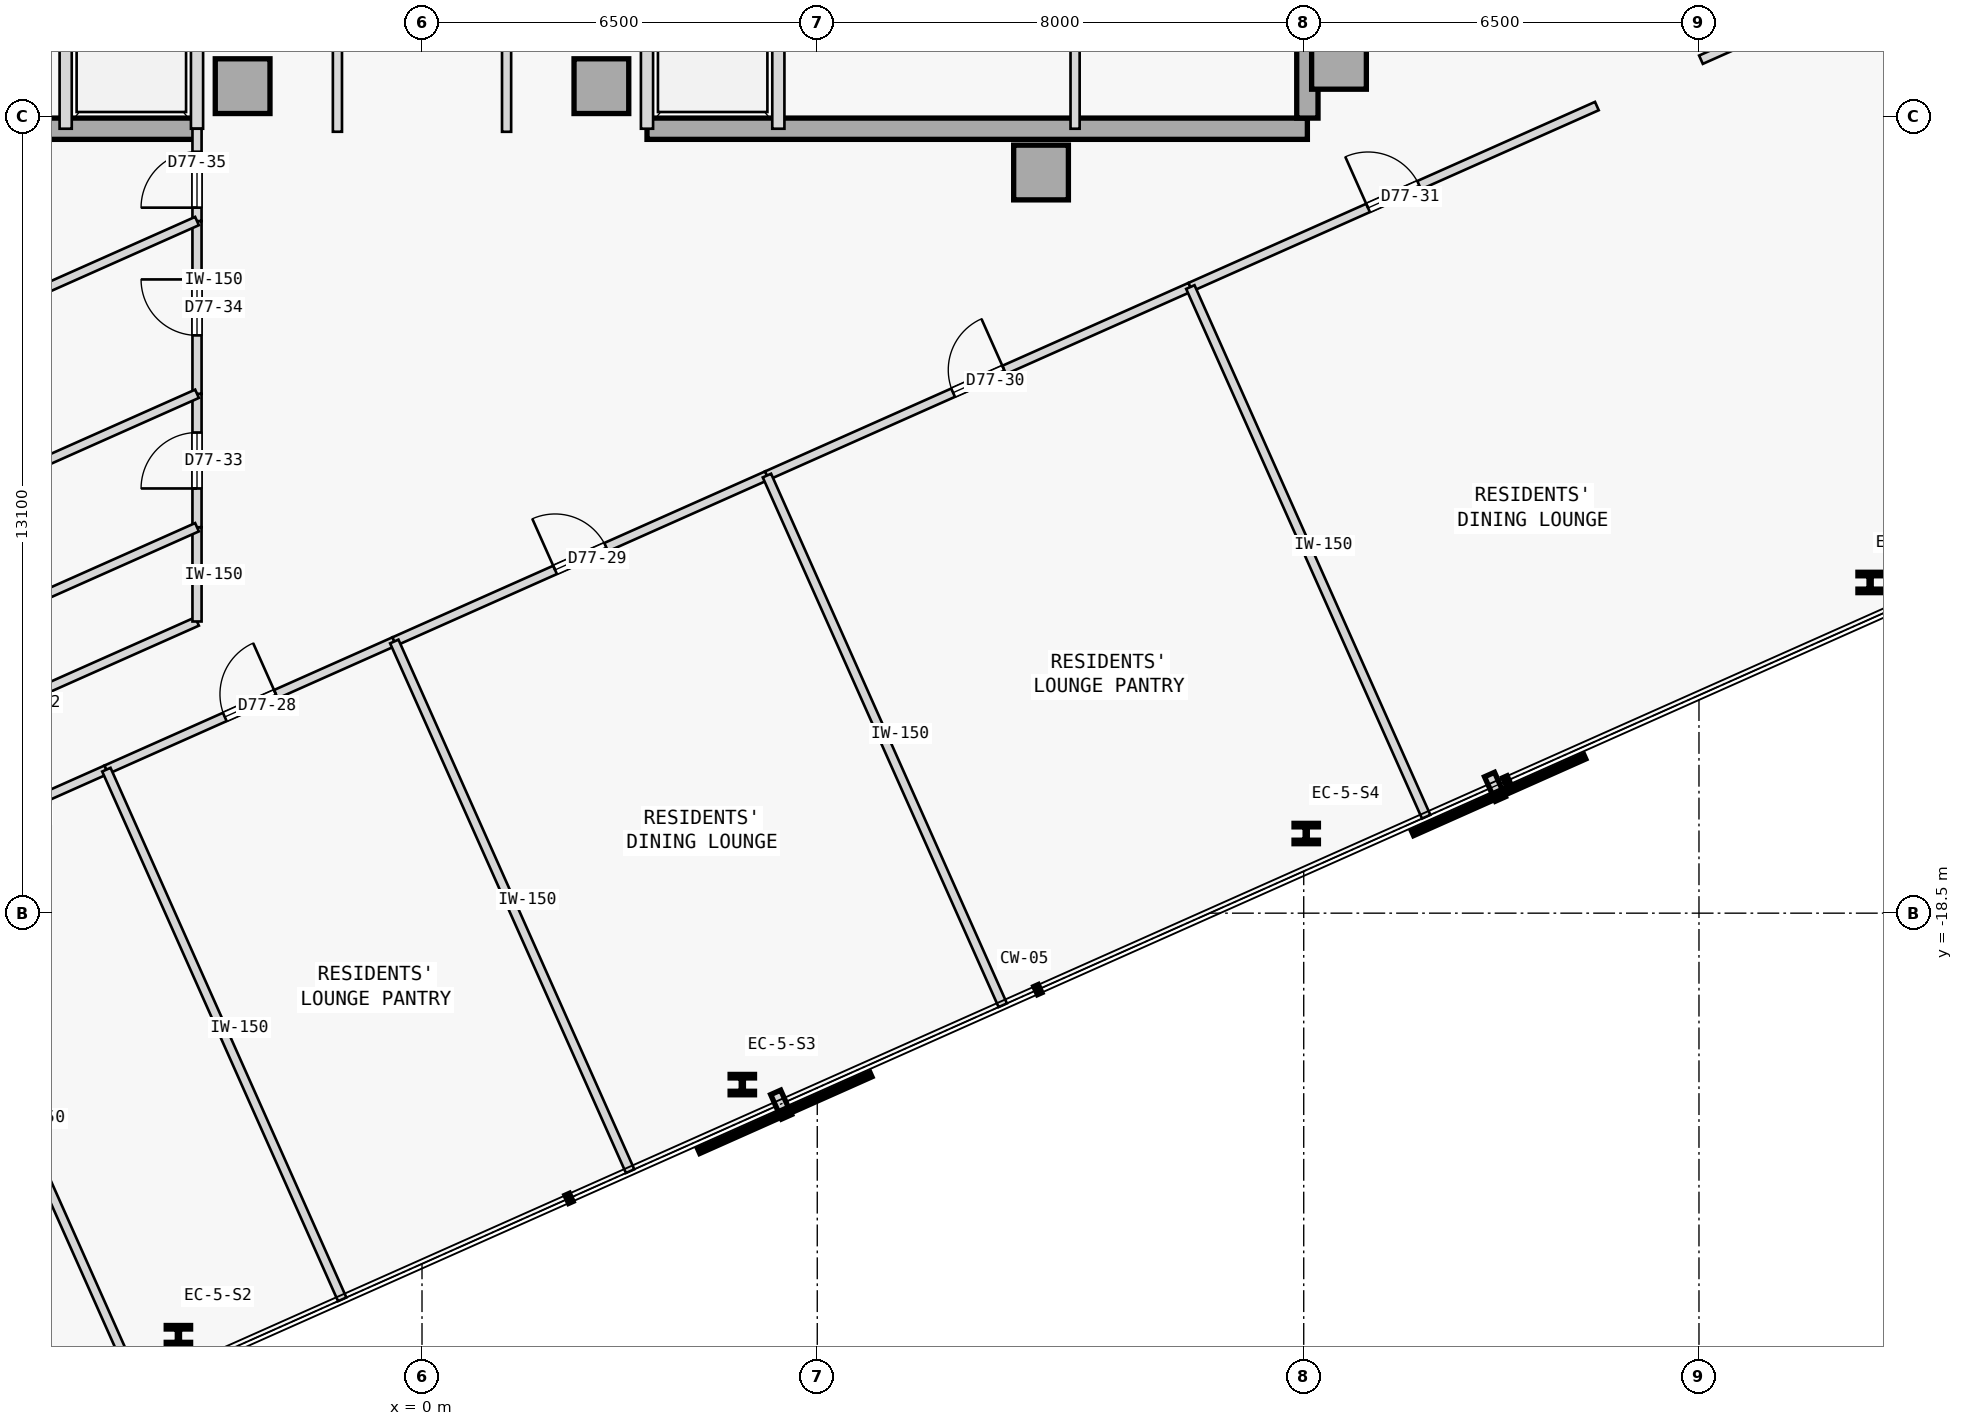
"""IFC4 building model, lengths in metres.
Left out: names, types, materials, properties, quantities, classifications, styles, units other than length and angle.
Written with IfcOpenShell. Run it as: python <this file> out.ifc"""

import sys

from ifc_helpers import new_model, si_unit, direction, frame, frame_2d, origin, origin_2d, place, context, subcontext, project, spatial, rectangle, i_section, extrude, element, fill, save


model = new_model("IFC4")
c1 = context("Model", 3, precision=1e-05, world=origin(), true_north=direction((0.0, 1.0)))
c2 = subcontext(c1, "Body", "Model", "MODEL_VIEW")
j1 = project(units=[si_unit("LENGTHUNIT", "METRE"), si_unit("PLANEANGLEUNIT", "RADIAN")], contexts=[c1])
p1 = place(None, origin())
s1 = spatial("IfcSite", under=j1, at=p1, CompositionType="ELEMENT")
p2 = place(p1, origin())
s2 = spatial("IfcBuilding", under=s1, at=p2, CompositionType="ELEMENT")
p3 = place(p2, frame((0.0, 0.0, 288.6)))
s3 = spatial("IfcBuildingStorey", under=s2, at=p3, CompositionType="ELEMENT", Elevation=288.6)
for number, where, z_axis, x_axis in (
    (1, (-2.95, -4.9, 0.0), (0.0, 0.0, 1.0), (1.0, 0.0, 0.0)),
    (2, (15.08, -4.5, 0.0), (0.0, 0.0, 1.0), (1.0, 0.0, 0.0)),
    (3, (10.18, -6.32, 0.0), (0.0, 0.0, 1.0), (1.0, 0.0, 0.0)),
    (4, (2.95, -4.9, 0.0), (0.0, 0.0, 1.0), (1.0, 0.0, 0.0)),
):
    element("IfcColumn", number, at=place(p3, frame(where, z_axis=z_axis, x_axis=x_axis)), inside=s3, PredefinedType="COLUMN", context=c2, shape_type="SweptSolid", body=[
        extrude(rectangle(XDim=0.9, YDim=0.9, at=origin_2d()), origin(), (0.0, 0.0, 1.0), 3.35),
    ])
for number, where, z_axis, x_axis in (
    (5, (-14.56, -5.6, 0.0), (0.0, 0.0, 1.0), (1.0, 0.0, 0.0)),
    (6, (3.7, -5.6, 0.0), (0.0, 0.0, 1.0), (1.0, 0.0, 0.0)),
):
    element("IfcWall", number, at=place(p3, frame(where, z_axis=z_axis, x_axis=x_axis)), inside=s3, PredefinedType="SHEAR", context=c2, shape_type="SweptSolid", body=[
        extrude(rectangle(XDim=10.86, YDim=0.35, at=frame_2d((5.43, 0.0))), origin(), (0.0, 0.0, 1.0), 3.125),
    ])
p4 = place(p3, frame((14.56, -5.425, 0.0), z_axis=(0.0, 0.0, 1.0), x_axis=(0.0, 1.0, 0.0)))
e7 = element("IfcWall", 7, at=p4, inside=s3, PredefinedType="SHEAR", context=c2, shape_type="SweptSolid", body=[
    extrude(rectangle(XDim=10.85, YDim=0.35, at=frame_2d((5.425, 0.0))), origin(), (0.0, 0.0, 1.0), 3.125),
])
for number, where, z_axis, x_axis in (
    (8, (-4.006, -25.448, 0.0), (0.0, 0.0, 1.0), (1.0, 0.0, 0.0)),
    (9, (5.268, -21.319, 0.0), (0.0, 0.0, 1.0), (1.0, 0.0, 0.0)),
    (10, (14.541, -17.19, 0.0), (0.0, 0.0, 1.0), (1.0, 0.0, 0.0)),
    (11, (23.814, -13.062, 0.0), (0.0, 0.0, 1.0), (1.0, 0.0, 0.0)),
):
    element("IfcColumn", number, at=place(p3, frame(where, z_axis=z_axis, x_axis=x_axis)), inside=s3, PredefinedType="COLUMN", context=c2, shape_type="SweptSolid", body=[
        extrude(i_section(OverallWidth=0.401, OverallDepth=0.335, WebThickness=0.036, FlangeThickness=0.058, FilletRadius=0.015, at=origin_2d()), origin(), (0.0, 0.0, 1.0), 3.35),
    ])
for number, where, z_axis, x_axis in (
    (12, (-3.7, -5.6, 0.0), (0.0, 0.0, 1.0), (0.0, 1.0, 0.0)),
    (13, (-5.86, -5.6, 0.0), (0.0, 0.0, 1.0), (0.0, 1.0, 0.0)),
    (14, (3.7, -5.6, 0.0), (0.0, 0.0, 1.0), (0.0, 1.0, 0.0)),
    (15, (5.86, -5.6, 0.0), (0.0, 0.0, 1.0), (0.0, 1.0, 0.0)),
):
    element("IfcWall", number, at=place(p3, frame(where, z_axis=z_axis, x_axis=x_axis)), inside=s3, PredefinedType="STANDARD", context=c2, shape_type="SweptSolid", body=[
        extrude(rectangle(XDim=2.65, YDim=0.2, at=frame_2d((1.325, 0.0))), origin(), (0.0, 0.0, 1.0), 3.125),
    ])
p5 = place(p3, frame((10.74, -5.6, 0.0), z_axis=(0.0, 0.0, 1.0), x_axis=(0.0, 1.0, 0.0)))
e16 = element("IfcWall", 16, at=p5, inside=s3, PredefinedType="PARTITIONING", context=c2, shape_type="SweptSolid", body=[
    extrude(rectangle(XDim=2.65, YDim=0.15, at=frame_2d((1.325, 0.0))), origin(), (0.0, 0.0, 1.0), 3.125),
])
p6 = place(p3, frame((-1.391, -5.65, 0.0), z_axis=(0.0, 0.0, 1.0), x_axis=(-2.1605738e-05, 0.999999999767, 0.0)))
e17 = element("IfcWall", 17, at=p6, inside=s3, PredefinedType="PARTITIONING", context=c2, shape_type="SweptSolid", body=[
    extrude(rectangle(XDim=11.3, YDim=0.15, at=frame_2d((5.65, 0.0))), origin(), (0.0, 0.0, 1.0), 3.125),
])
p7 = place(p3, frame((1.391, -5.65, 0.0), z_axis=(0.0, 0.0, 1.0), x_axis=(4.3206809e-05, 0.999999999067, 0.0)))
e18 = element("IfcWall", 18, at=p7, inside=s3, PredefinedType="PARTITIONING", context=c2, shape_type="SweptSolid", body=[
    extrude(rectangle(XDim=11.301, YDim=0.15, at=frame_2d((5.65, 0.0))), origin(), (0.0, 0.0, 1.0), 3.125),
])
p8 = place(p7, frame((5.176, 0.0, 0.0)))
e19 = element("IfcOpeningElement", 19, at=p8, cuts=e18, PredefinedType="OPENING", context=c2, shape_type="SweptSolid", body=[
    extrude(rectangle(XDim=0.95, YDim=2.15, at=frame_2d((0.475, 1.075))), frame((0.0, 0.085, 0.0), z_axis=(0.0, -1.0, 0.0), x_axis=(1.0, 0.0, 0.0)), (0.0, 0.0, 1.0), 0.17),
])
p9 = place(p3, frame((21.033, -4.465, 0.0), z_axis=(0.0, 0.0, 1.0), x_axis=(0.913543802, 0.40674036169, 0.0)))
e20 = element("IfcWall", 20, at=p9, inside=s3, PredefinedType="PARTITIONING", context=c2, shape_type="SweptSolid", body=[
    extrude(rectangle(XDim=3.65, YDim=0.15, at=frame_2d((1.825, 0.0))), origin(), (0.0, 0.0, 1.0), 3.125),
])
p10 = place(p3, frame((-8.533, -17.628, 0.0), z_axis=(0.0, 0.0, 1.0), x_axis=(0.913560976273, 0.406701785873, 0.0)))
e21 = element("IfcWall", 21, at=p10, inside=s3, PredefinedType="PARTITIONING", context=c2, shape_type="SweptSolid", body=[
    extrude(rectangle(XDim=3.659, YDim=0.15, at=frame_2d((1.829, 0.0))), origin(), (0.0, 0.0, 1.0), 3.125),
])
p11 = place(p10, frame((1.369, 0.0, 0.0)))
e22 = element("IfcOpeningElement", 22, at=p11, cuts=e21, PredefinedType="OPENING", context=c2, shape_type="SweptSolid", body=[
    extrude(rectangle(XDim=0.92, YDim=2.15, at=frame_2d((0.46, 1.075))), frame((0.0, 0.085, 0.0), z_axis=(0.0, -1.0, 0.0), x_axis=(1.0, 0.0, 0.0)), (0.0, 0.0, 1.0), 0.17),
])
p12 = place(p3, frame((-5.191, -16.14, 0.0), z_axis=(0.0, 0.0, 1.0), x_axis=(0.913541346619, 0.40674587646, 0.0)))
e23 = element("IfcWall", 23, at=p12, inside=s3, PredefinedType="PARTITIONING", context=c2, shape_type="SweptSolid", body=[
    extrude(rectangle(XDim=5.183, YDim=0.15, at=frame_2d((2.591, 0.0))), origin(), (0.0, 0.0, 1.0), 3.125),
])
p13 = place(p12, frame((2.132, 0.0, 0.0)))
e24 = element("IfcOpeningElement", 24, at=p13, cuts=e23, PredefinedType="OPENING", context=c2, shape_type="SweptSolid", body=[
    extrude(rectangle(XDim=0.92, YDim=2.15, at=frame_2d((0.46, 1.075))), frame((0.0, 0.085, 0.0), z_axis=(0.0, -1.0, 0.0), x_axis=(1.0, 0.0, 0.0)), (0.0, 0.0, 1.0), 0.17),
])
p14 = place(p3, frame((-0.456, -14.032, 0.0), z_axis=(0.0, 0.0, 1.0), x_axis=(0.913541200883, 0.40674620378, 0.0)))
e25 = element("IfcWall", 25, at=p14, inside=s3, PredefinedType="PARTITIONING", context=c2, shape_type="SweptSolid", body=[
    extrude(rectangle(XDim=6.708, YDim=0.15, at=frame_2d((3.354, 0.0))), origin(), (0.0, 0.0, 1.0), 3.125),
])
p15 = place(p14, frame((2.894, 0.0, 0.0)))
e26 = element("IfcOpeningElement", 26, at=p15, cuts=e25, PredefinedType="OPENING", context=c2, shape_type="SweptSolid", body=[
    extrude(rectangle(XDim=0.92, YDim=2.15, at=frame_2d((0.46, 1.075))), frame((0.0, 0.085, 0.0), z_axis=(0.0, -1.0, 0.0), x_axis=(1.0, 0.0, 0.0)), (0.0, 0.0, 1.0), 0.17),
])
p16 = place(p3, frame((5.672, -11.304, 0.0), z_axis=(0.0, 0.0, 1.0), x_axis=(0.913549829505, 0.40672682357, 0.0)))
e27 = element("IfcWall", 27, at=p16, inside=s3, PredefinedType="PARTITIONING", context=c2, shape_type="SweptSolid", body=[
    extrude(rectangle(XDim=7.622, YDim=0.15, at=frame_2d((3.811, 0.0))), origin(), (0.0, 0.0, 1.0), 3.125),
])
p17 = place(p16, frame((3.351, 0.0, 0.0)))
e28 = element("IfcOpeningElement", 28, at=p17, cuts=e27, PredefinedType="OPENING", context=c2, shape_type="SweptSolid", body=[
    extrude(rectangle(XDim=0.92, YDim=2.15, at=frame_2d((0.46, 1.075))), frame((0.0, 0.085, 0.0), z_axis=(0.0, -1.0, 0.0), x_axis=(1.0, 0.0, 0.0)), (0.0, 0.0, 1.0), 0.17),
])
p18 = place(p3, frame((12.635, -8.204, 0.0), z_axis=(0.0, 0.0, 1.0), x_axis=(0.913541702649, 0.406745076825, 0.0)))
e29 = element("IfcWall", 29, at=p18, inside=s3, PredefinedType="PARTITIONING", context=c2, shape_type="SweptSolid", body=[
    extrude(rectangle(XDim=7.318, YDim=0.15, at=frame_2d((3.659, 0.0))), origin(), (0.0, 0.0, 1.0), 3.125),
])
p19 = place(p18, frame((3.199, 0.0, 0.0)))
e30 = element("IfcOpeningElement", 30, at=p19, cuts=e29, PredefinedType="OPENING", context=c2, shape_type="SweptSolid", body=[
    extrude(rectangle(XDim=0.92, YDim=2.15, at=frame_2d((0.46, 1.075))), frame((0.0, 0.085, 0.0), z_axis=(0.0, -1.0, 0.0), x_axis=(1.0, 0.0, 0.0)), (0.0, 0.0, 1.0), 0.17),
])
p20 = place(p3, frame((-9.702, -16.375, 0.0), z_axis=(0.0, 0.0, 1.0), x_axis=(0.913552389019, 0.406721074594, 0.0)))
e31 = element("IfcWall", 31, at=p20, inside=s3, PredefinedType="PARTITIONING", context=c2, shape_type="SweptSolid", body=[
    extrude(rectangle(XDim=6.57, YDim=0.15, at=frame_2d((3.285, 0.0))), origin(), (0.0, 0.0, 1.0), 3.125),
])
p21 = place(p20, frame((2.825, 0.0, 0.0)))
e32 = element("IfcOpeningElement", 32, at=p21, cuts=e31, PredefinedType="OPENING", context=c2, shape_type="SweptSolid", body=[
    extrude(rectangle(XDim=0.92, YDim=2.15, at=frame_2d((0.46, 1.075))), frame((0.0, 0.085, 0.0), z_axis=(0.0, -1.0, 0.0), x_axis=(1.0, 0.0, 0.0)), (0.0, 0.0, 1.0), 0.17),
])
p22 = place(p3, frame((-3.7, -13.703, 0.0), z_axis=(0.0, 0.0, 1.0), x_axis=(-0.000157529929, 0.999999987592, 0.0)))
e33 = element("IfcWall", 33, at=p22, inside=s3, PredefinedType="PARTITIONING", context=c2, shape_type="SweptSolid", body=[
    extrude(rectangle(XDim=1.55, YDim=0.15, at=frame_2d((0.775, 0.0))), origin(), (0.0, 0.0, 1.0), 3.125),
])
p23 = place(p3, frame((-3.7, -12.154, 0.0), z_axis=(0.0, 0.0, 1.0), x_axis=(0.000111222333, 0.999999993815, 0.0)))
e34 = element("IfcWall", 34, at=p23, inside=s3, PredefinedType="PARTITIONING", context=c2, shape_type="SweptSolid", body=[
    extrude(rectangle(XDim=2.195, YDim=0.15, at=frame_2d((1.098, 0.0))), origin(), (0.0, 0.0, 1.0), 3.125),
])
p24 = place(p23, frame((0.637, 0.0, 0.0)))
e35 = element("IfcOpeningElement", 35, at=p24, cuts=e34, PredefinedType="OPENING", context=c2, shape_type="SweptSolid", body=[
    extrude(rectangle(XDim=0.92, YDim=2.15, at=frame_2d((0.46, 1.075))), frame((0.0, 0.085, 0.0), z_axis=(0.0, -1.0, 0.0), x_axis=(1.0, 0.0, 0.0)), (0.0, 0.0, 1.0), 0.17),
])
p25 = place(p3, frame((-3.7, -9.958, 0.0), z_axis=(0.0, 0.0, 1.0), x_axis=(-0.000171909917, 0.999999985223, 0.0)))
e36 = element("IfcWall", 36, at=p25, inside=s3, PredefinedType="PARTITIONING", context=c2, shape_type="SweptSolid", body=[
    extrude(rectangle(XDim=2.84, YDim=0.15, at=frame_2d((1.42, 0.0))), origin(), (0.0, 0.0, 1.0), 3.125),
])
p26 = place(p25, frame((0.96, 0.0, 0.0)))
e37 = element("IfcOpeningElement", 37, at=p26, cuts=e36, PredefinedType="OPENING", context=c2, shape_type="SweptSolid", body=[
    extrude(rectangle(XDim=0.92, YDim=2.15, at=frame_2d((0.46, 1.075))), frame((0.0, 0.085, 0.0), z_axis=(0.0, -1.0, 0.0), x_axis=(1.0, 0.0, 0.0)), (0.0, 0.0, 1.0), 0.17),
])
p27 = place(p3, frame((-3.7, -7.118, 0.0), z_axis=(0.0, 0.0, 1.0), x_axis=(0.000321543392, 0.999999948305, 0.0)))
e38 = element("IfcWall", 38, at=p27, inside=s3, PredefinedType="PARTITIONING", context=c2, shape_type="SweptSolid", body=[
    extrude(rectangle(XDim=1.519, YDim=0.15, at=frame_2d((0.759, 0.0))), origin(), (0.0, 0.0, 1.0), 3.125),
])
p28 = place(p27, frame((0.22, 0.0, 0.0)))
e39 = element("IfcOpeningElement", 39, at=p28, cuts=e38, PredefinedType="OPENING", context=c2, shape_type="SweptSolid", body=[
    extrude(rectangle(XDim=0.92, YDim=2.15, at=frame_2d((0.46, 1.075))), frame((0.0, 0.085, 0.0), z_axis=(0.0, -1.0, 0.0), x_axis=(1.0, 0.0, 0.0)), (0.0, 0.0, 1.0), 0.17),
])
for number, where, z_axis, x_axis in (
    (40, (-4.655, -26.339, 0.0), (0.0, 0.0, 1.0), (-0.407, 0.914, 0.0)),
    (41, (-1.312, -24.851, 0.0), (0.0, 0.0, 1.0), (-0.407, 0.914, 0.0)),
):
    element("IfcWall", number, at=place(p3, frame(where, z_axis=z_axis, x_axis=x_axis)), inside=s3, PredefinedType="PARTITIONING", context=c2, shape_type="SweptSolid", body=[
        extrude(rectangle(XDim=9.535, YDim=0.15, at=frame_2d((4.768, 0.0))), origin(), (0.0, 0.0, 1.0), 3.125),
    ])
p29 = place(p3, frame((3.423, -22.743, 0.0), z_axis=(0.0, 0.0, 1.0), x_axis=(-0.406751296215, 0.913538933504, 0.0)))
e42 = element("IfcWall", 42, at=p29, inside=s3, PredefinedType="PARTITIONING", context=c2, shape_type="SweptSolid", body=[
    extrude(rectangle(XDim=9.535, YDim=0.15, at=frame_2d((4.768, 0.0))), origin(), (0.0, 0.0, 1.0), 3.125),
])
for number, where, z_axis, x_axis in (
    (43, (9.551, -20.014, 0.0), (0.0, 0.0, 1.0), (-0.407, 0.914, 0.0)),
    (44, (16.514, -16.914, 0.0), (0.0, 0.0, 1.0), (-0.407, 0.914, 0.0)),
):
    element("IfcWall", number, at=place(p3, frame(where, z_axis=z_axis, x_axis=x_axis)), inside=s3, PredefinedType="PARTITIONING", context=c2, shape_type="SweptSolid", body=[
        extrude(rectangle(XDim=9.535, YDim=0.15, at=frame_2d((4.768, 0.0))), origin(), (0.0, 0.0, 1.0), 3.125),
    ])
p30 = place(p3, frame((-10.278, -15.082, 0.0), z_axis=(0.0, 0.0, 1.0), x_axis=(0.913549882956, 0.406726703513, 0.0)))
e45 = element("IfcWall", 45, at=p30, inside=s3, PredefinedType="PARTITIONING", context=c2, shape_type="SweptSolid", body=[
    extrude(rectangle(XDim=7.2, YDim=0.15, at=frame_2d((3.6, 0.0))), origin(), (0.0, 0.0, 1.0), 3.125),
])
p31 = place(p3, frame((-11.093, -13.25, 0.0), z_axis=(0.0, 0.0, 1.0), x_axis=(0.913543891457, 0.406740160767, 0.0)))
e46 = element("IfcWall", 46, at=p31, inside=s3, PredefinedType="PARTITIONING", context=c2, shape_type="SweptSolid", body=[
    extrude(rectangle(XDim=8.093, YDim=0.15, at=frame_2d((4.046, 0.0))), origin(), (0.0, 0.0, 1.0), 3.125),
])
p32 = place(p3, frame((-12.149, -10.88, 0.0), z_axis=(0.0, 0.0, 1.0), x_axis=(0.913542450291, 0.406743397631, 0.0)))
e47 = element("IfcWall", 47, at=p32, inside=s3, PredefinedType="PARTITIONING", context=c2, shape_type="SweptSolid", body=[
    extrude(rectangle(XDim=9.248, YDim=0.15, at=frame_2d((4.624, 0.0))), origin(), (0.0, 0.0, 1.0), 3.125),
])
p33 = place(p13, origin())
e48 = element("IfcDoor", 48, at=p33, inside=s3, OperationType="SINGLE_SWING_RIGHT", PredefinedType="DOOR", context=c2, shape_type="SweptSolid", body=[
    extrude(rectangle(XDim=0.92, YDim=2.15, at=frame_2d((0.46, 1.075))), frame((0.0, 0.025, 0.0), z_axis=(0.0, -1.0, 0.0), x_axis=(1.0, 0.0, 0.0)), (0.0, 0.0, 1.0), 0.05),
])
fill(e24, e48)
p34 = place(p15, origin())
e49 = element("IfcDoor", 49, at=p34, inside=s3, OperationType="SINGLE_SWING_LEFT", PredefinedType="DOOR", context=c2, shape_type="SweptSolid", body=[
    extrude(rectangle(XDim=0.92, YDim=2.15, at=frame_2d((0.46, 1.075))), frame((0.0, 0.025, 0.0), z_axis=(0.0, -1.0, 0.0), x_axis=(1.0, 0.0, 0.0)), (0.0, 0.0, 1.0), 0.05),
])
fill(e26, e49)
p35 = place(p17, origin())
e50 = element("IfcDoor", 50, at=p35, inside=s3, OperationType="SINGLE_SWING_RIGHT", PredefinedType="DOOR", context=c2, shape_type="SweptSolid", body=[
    extrude(rectangle(XDim=0.92, YDim=2.15, at=frame_2d((0.46, 1.075))), frame((0.0, 0.025, 0.0), z_axis=(0.0, -1.0, 0.0), x_axis=(1.0, 0.0, 0.0)), (0.0, 0.0, 1.0), 0.05),
])
fill(e28, e50)
p36 = place(p19, origin())
e51 = element("IfcDoor", 51, at=p36, inside=s3, OperationType="SINGLE_SWING_LEFT", PredefinedType="DOOR", context=c2, shape_type="SweptSolid", body=[
    extrude(rectangle(XDim=0.92, YDim=2.15, at=frame_2d((0.46, 1.075))), frame((0.0, 0.025, 0.0), z_axis=(0.0, -1.0, 0.0), x_axis=(1.0, 0.0, 0.0)), (0.0, 0.0, 1.0), 0.05),
])
fill(e30, e51)
p37 = place(p24, origin())
e52 = element("IfcDoor", 52, at=p37, inside=s3, OperationType="SINGLE_SWING_LEFT", PredefinedType="DOOR", context=c2, shape_type="SweptSolid", body=[
    extrude(rectangle(XDim=0.92, YDim=2.15, at=frame_2d((0.46, 1.075))), frame((0.0, 0.025, 0.0), z_axis=(0.0, -1.0, 0.0), x_axis=(1.0, 0.0, 0.0)), (0.0, 0.0, 1.0), 0.05),
])
fill(e35, e52)
p38 = place(p26, origin())
e53 = element("IfcDoor", 53, at=p38, inside=s3, OperationType="SINGLE_SWING_RIGHT", PredefinedType="DOOR", context=c2, shape_type="SweptSolid", body=[
    extrude(rectangle(XDim=0.92, YDim=2.15, at=frame_2d((0.46, 1.075))), frame((0.0, 0.025, 0.0), z_axis=(0.0, -1.0, 0.0), x_axis=(1.0, 0.0, 0.0)), (0.0, 0.0, 1.0), 0.05),
])
fill(e37, e53)
p39 = place(p28, origin())
e54 = element("IfcDoor", 54, at=p39, inside=s3, OperationType="SINGLE_SWING_LEFT", PredefinedType="DOOR", context=c2, shape_type="SweptSolid", body=[
    extrude(rectangle(XDim=0.92, YDim=2.15, at=frame_2d((0.46, 1.075))), frame((0.0, 0.025, 0.0), z_axis=(0.0, -1.0, 0.0), x_axis=(1.0, 0.0, 0.0)), (0.0, 0.0, 1.0), 0.05),
])
fill(e39, e54)
save(model, sys.argv[1])
